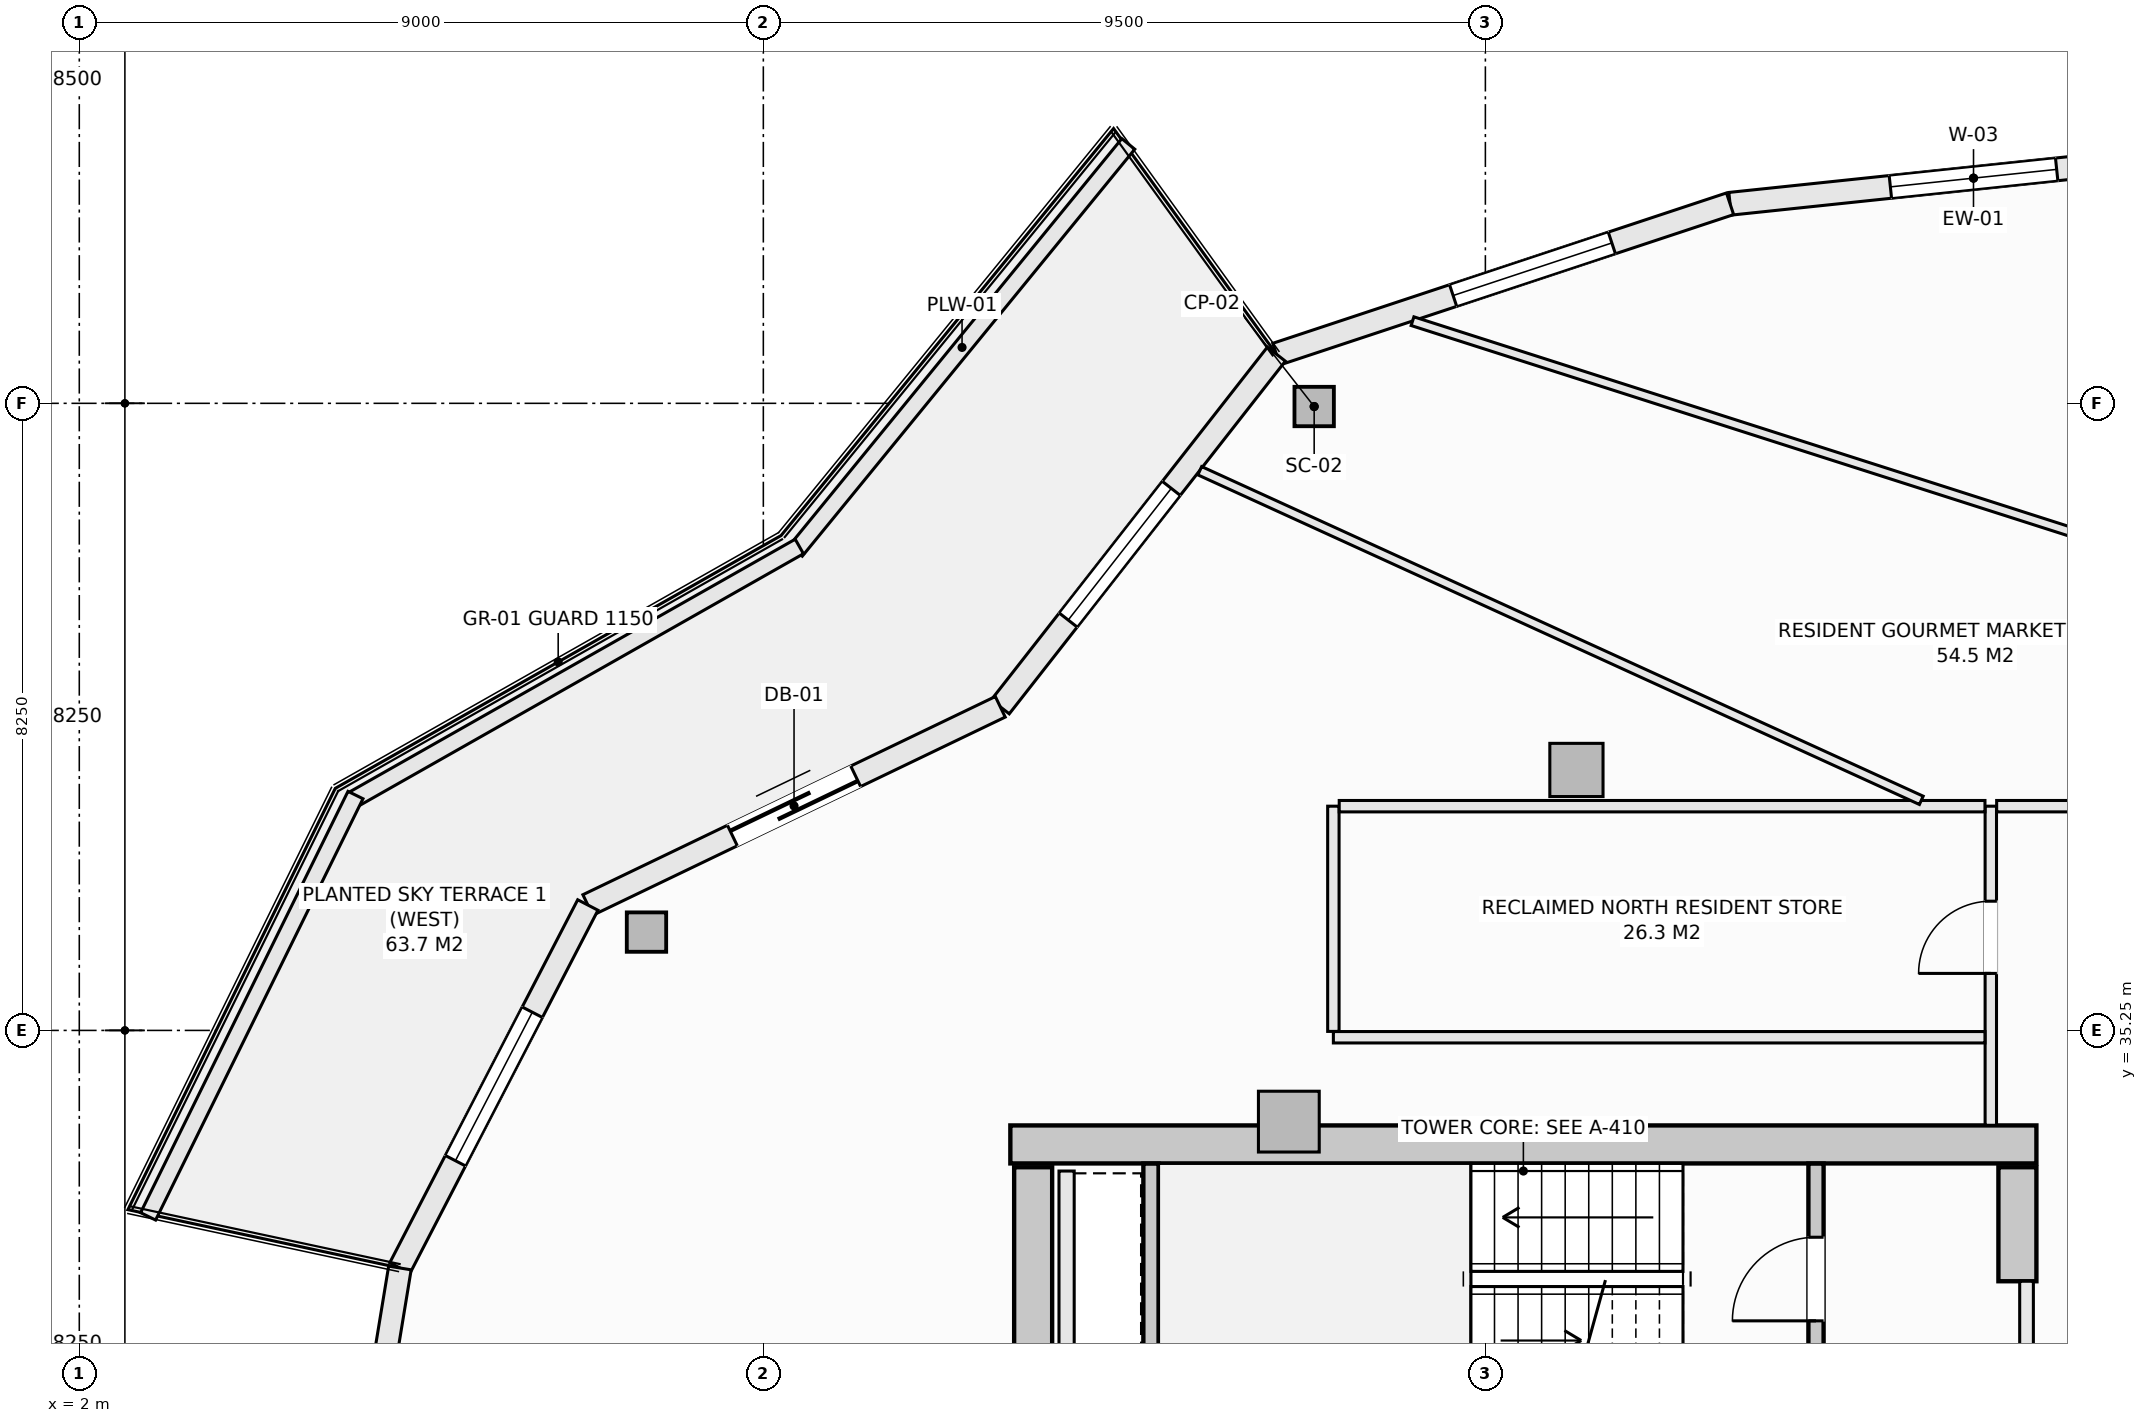
"""IFC4 building model, lengths in metres.
Left out: names, types, materials, properties, quantities, classifications, styles, units other than length and angle.
Written with IfcOpenShell. Run it as: python <this file> out.ifc"""

import sys

from ifc_helpers import new_model, si_unit, direction, frame, frame_2d, origin, origin_2d, place, context, subcontext, project, spatial, rectangle, hollow_rectangle, extrude, element, fill, save


model = new_model("IFC4")
c1 = context("Model", 3, precision=1e-05, world=origin(), true_north=direction((0.0, 1.0)))
c2 = subcontext(c1, "Body", "Model", "MODEL_VIEW")
j1 = project(units=[si_unit("LENGTHUNIT", "METRE"), si_unit("PLANEANGLEUNIT", "RADIAN")], contexts=[c1])
p1 = place(None, origin())
s1 = spatial("IfcSite", under=j1, at=p1, CompositionType="ELEMENT")
p2 = place(p1, origin())
s2 = spatial("IfcBuilding", under=s1, at=p2, CompositionType="ELEMENT")
p3 = place(p2, frame((0.0, 0.0, 236.0)))
s3 = spatial("IfcBuildingStorey", under=s2, at=p3, CompositionType="ELEMENT", Elevation=236.0)
p4 = place(p3, frame((14.25, 33.75, -0.27), z_axis=(0.0, 0.0, 1.0), x_axis=(1.0, 0.0, 0.0)))
e1 = element("IfcWall", 1, at=p4, inside=s3, PredefinedType="SHEAR", context=c2, shape_type="SweptSolid", body=[
    extrude(rectangle(XDim=13.5, YDim=0.5, at=frame_2d((6.75, 0.0))), origin(), (0.0, 0.0, 1.0), 3.3),
])
p5 = place(p3, frame((14.55, 20.55, -0.27), z_axis=(0.0, 0.0, 1.0), x_axis=(0.0, 1.0, 0.0)))
e2 = element("IfcWall", 2, at=p5, inside=s3, PredefinedType="SHEAR", context=c2, shape_type="SweptSolid", body=[
    extrude(rectangle(XDim=12.9, YDim=0.5, at=frame_2d((6.45, 0.0))), origin(), (0.0, 0.0, 1.0), 3.3),
])
p6 = place(p3, frame((27.5, 31.95, -0.27), z_axis=(0.0, 0.0, 1.0), x_axis=(0.0, 1.0, 0.0)))
e3 = element("IfcWall", 3, at=p6, inside=s3, PredefinedType="SHEAR", context=c2, shape_type="SweptSolid", body=[
    extrude(rectangle(XDim=1.5, YDim=0.5, at=frame_2d((0.75, 0.0))), origin(), (0.0, 0.0, 1.0), 3.3),
])
for number, where, z_axis, x_axis in (
    (4, (18.247, 43.458, -0.27), (0.0, 0.0, 1.0), (1.0, 0.0, 0.0)),
    (5, (9.463, 36.544, -0.27), (0.0, 0.0, 1.0), (1.0, 0.0, 0.0)),
):
    element("IfcColumn", number, at=place(p3, frame(where, z_axis=z_axis, x_axis=x_axis)), inside=s3, PredefinedType="COLUMN", context=c2, shape_type="SweptSolid", body=[
        extrude(hollow_rectangle(XDim=0.508, YDim=0.508, WallThickness=0.019, at=origin_2d()), origin(), (0.0, 0.0, 1.0), 3.3),
    ])
p7 = place(p3, frame((21.698, 38.677, -0.27), z_axis=(0.0, 0.0, 1.0), x_axis=(1.0, 0.0, 0.0)))
e6 = element("IfcColumn", 6, at=p7, inside=s3, PredefinedType="COLUMN", context=c2, shape_type="SweptSolid", body=[
    extrude(rectangle(XDim=0.7, YDim=0.7, at=origin_2d()), origin(), (0.0, 0.0, 1.0), 3.3),
])
p8 = place(p3, frame((17.914, 34.05, -0.27), z_axis=(0.0, 0.0, 1.0), x_axis=(1.0, 0.0, 0.0)))
e7 = element("IfcColumn", 7, at=p8, inside=s3, PredefinedType="PILASTER", context=c2, shape_type="SweptSolid", body=[
    extrude(rectangle(XDim=0.8, YDim=0.8, at=origin_2d()), origin(), (0.0, 0.0, 1.0), 3.3),
])
p9 = place(p3, frame((23.719, 46.125, 0.0), z_axis=(0.0, 0.0, 1.0), x_axis=(0.994497142298, 0.104763705363, 0.0)))
e8 = element("IfcWall", 8, at=p9, inside=s3, PredefinedType="SOLIDWALL", context=c2, shape_type="SweptSolid", body=[
    extrude(rectangle(XDim=6.441, YDim=0.3, at=frame_2d((3.221, 0.0))), origin(), (0.0, 0.0, 1.0), 2.605),
])
p10 = place(p9, frame((2.121, 0.0, 0.72)))
e9 = element("IfcOpeningElement", 9, at=p10, cuts=e8, PredefinedType="OPENING", context=c2, shape_type="SweptSolid", body=[
    extrude(rectangle(XDim=2.2, YDim=1.65, at=frame_2d((1.1, 0.825))), frame((0.0, 0.16, 0.0), z_axis=(0.0, -1.0, 0.0), x_axis=(1.0, 0.0, 0.0)), (0.0, 0.0, 1.0), 0.32),
])
p11 = place(p3, frame((17.75, 44.147, 0.0), z_axis=(0.0, 0.0, 1.0), x_axis=(0.949240877604, 0.314550085495, 0.0)))
e10 = element("IfcWall", 10, at=p11, inside=s3, PredefinedType="SOLIDWALL", context=c2, shape_type="SweptSolid", body=[
    extrude(rectangle(XDim=6.288, YDim=0.3, at=frame_2d((3.144, 0.0))), origin(), (0.0, 0.0, 1.0), 2.605),
])
p12 = place(p11, frame((2.45, 0.0, 0.72)))
e11 = element("IfcOpeningElement", 11, at=p12, cuts=e10, PredefinedType="OPENING", context=c2, shape_type="SweptSolid", body=[
    extrude(rectangle(XDim=2.2, YDim=1.65, at=frame_2d((1.1, 0.825))), frame((0.0, 0.16, 0.0), z_axis=(0.0, -1.0, 0.0), x_axis=(1.0, 0.0, 0.0)), (0.0, 0.0, 1.0), 0.32),
])
p13 = place(p3, frame((14.117, 39.507, 0.0), z_axis=(0.0, 0.0, 1.0), x_axis=(0.616450126935, 0.787393955401, 0.0)))
e12 = element("IfcWall", 12, at=p13, inside=s3, PredefinedType="SOLIDWALL", context=c2, shape_type="SweptSolid", body=[
    extrude(rectangle(XDim=5.893, YDim=0.3, at=frame_2d((2.946, 0.0))), origin(), (0.0, 0.0, 1.0), 2.605),
])
p14 = place(p13, frame((1.45, 0.0, 0.72)))
e13 = element("IfcOpeningElement", 13, at=p14, cuts=e12, PredefinedType="OPENING", context=c2, shape_type="SweptSolid", body=[
    extrude(rectangle(XDim=2.2, YDim=1.65, at=frame_2d((1.1, 0.825))), frame((0.0, 0.16, 0.0), z_axis=(0.0, -1.0, 0.0), x_axis=(1.0, 0.0, 0.0)), (0.0, 0.0, 1.0), 0.32),
])
p15 = place(p3, frame((8.691, 36.9, 0.0), z_axis=(0.0, 0.0, 1.0), x_axis=(0.901348331142, 0.433094892545, 0.0)))
e14 = element("IfcWall", 14, at=p15, inside=s3, PredefinedType="SOLIDWALL", context=c2, shape_type="SweptSolid", body=[
    extrude(rectangle(XDim=6.021, YDim=0.3, at=frame_2d((3.01, 0.0))), origin(), (0.0, 0.0, 1.0), 2.605),
])
p16 = place(p15, frame((2.11, 0.0, 0.0)))
e15 = element("IfcOpeningElement", 15, at=p16, cuts=e14, PredefinedType="OPENING", context=c2, shape_type="SweptSolid", body=[
    extrude(rectangle(XDim=1.8, YDim=2.25, at=frame_2d((0.9, 1.125))), frame((0.0, 0.16, 0.0), z_axis=(0.0, -1.0, 0.0), x_axis=(1.0, 0.0, 0.0)), (0.0, 0.0, 1.0), 0.32),
])
p17 = place(p3, frame((6.218, 32.125, 0.0), z_axis=(0.0, 0.0, 1.0), x_axis=(0.459808219482, 0.888018243786, 0.0)))
e16 = element("IfcWall", 16, at=p17, inside=s3, PredefinedType="SOLIDWALL", context=c2, shape_type="SweptSolid", body=[
    extrude(rectangle(XDim=5.378, YDim=0.3, at=frame_2d((2.689, 0.0))), origin(), (0.0, 0.0, 1.0), 2.605),
])
p18 = place(p17, frame((1.589, 0.0, 0.72)))
e17 = element("IfcOpeningElement", 17, at=p18, cuts=e16, PredefinedType="OPENING", context=c2, shape_type="SweptSolid", body=[
    extrude(rectangle(XDim=2.2, YDim=1.65, at=frame_2d((1.1, 0.825))), frame((0.0, 0.16, 0.0), z_axis=(0.0, -1.0, 0.0), x_axis=(1.0, 0.0, 0.0)), (0.0, 0.0, 1.0), 0.32),
])
p19 = place(p3, frame((5.375, 27.0, 0.0), z_axis=(0.0, 0.0, 1.0), x_axis=(0.16237087798, 0.986729799886, 0.0)))
e18 = element("IfcWall", 18, at=p19, inside=s3, PredefinedType="SOLIDWALL", context=c2, shape_type="SweptSolid", body=[
    extrude(rectangle(XDim=5.193, YDim=0.3, at=frame_2d((2.597, 0.0))), origin(), (0.0, 0.0, 1.0), 2.605),
])
p20 = place(p19, frame((1.497, 0.0, 0.72)))
e19 = element("IfcOpeningElement", 19, at=p20, cuts=e18, PredefinedType="OPENING", context=c2, shape_type="SweptSolid", body=[
    extrude(rectangle(XDim=2.2, YDim=1.65, at=frame_2d((1.1, 0.825))), frame((0.0, 0.16, 0.0), z_axis=(0.0, -1.0, 0.0), x_axis=(1.0, 0.0, 0.0)), (0.0, 0.0, 1.0), 0.32),
])
p21 = place(p3, frame((11.427, 41.559, 0.0), z_axis=(0.0, 0.0, 1.0), x_axis=(0.632697312147, 0.774399193699, 0.0)))
e20 = element("IfcWall", 20, at=p21, inside=s3, PredefinedType="PARAPET", context=c2, shape_type="SweptSolid", body=[
    extrude(rectangle(XDim=6.914, YDim=0.22, at=frame_2d((3.457, 0.0))), origin(), (0.0, 0.0, 1.0), 0.52),
])
p22 = place(p3, frame((5.608, 38.291, 0.0), z_axis=(0.0, 0.0, 1.0), x_axis=(0.869860619267, 0.493297580623, 0.0)))
e21 = element("IfcWall", 21, at=p22, inside=s3, PredefinedType="PARAPET", context=c2, shape_type="SweptSolid", body=[
    extrude(rectangle(XDim=6.743, YDim=0.22, at=frame_2d((3.371, 0.0))), origin(), (0.0, 0.0, 1.0), 0.52),
])
p23 = place(p3, frame((2.906, 32.804, 0.0), z_axis=(0.0, 0.0, 1.0), x_axis=(0.441640961804, 0.897191875162, 0.0)))
e22 = element("IfcWall", 22, at=p23, inside=s3, PredefinedType="PARAPET", context=c2, shape_type="SweptSolid", body=[
    extrude(rectangle(XDim=6.178, YDim=0.22, at=frame_2d((3.089, 0.0))), origin(), (0.0, 0.0, 1.0), 0.52),
])
p24 = place(p3, frame((24.85, 30.46, -0.27), z_axis=(0.0, 0.0, 1.0), x_axis=(0.0, 1.0, 0.0)))
e23 = element("IfcWall", 23, at=p24, inside=s3, PredefinedType="SHEAR", context=c2, shape_type="SweptSolid", body=[
    extrude(rectangle(XDim=3.038, YDim=0.2, at=frame_2d((1.519, 0.0))), origin(), (0.0, 0.0, 1.0), 3.3),
])
p25 = place(p24, frame((0.969, 0.0, 0.27)))
e24 = element("IfcOpeningElement", 24, at=p25, cuts=e23, PredefinedType="OPENING", context=c2, shape_type="SweptSolid", body=[
    extrude(rectangle(XDim=1.1, YDim=2.15, at=frame_2d((0.55, 1.075))), frame((0.0, 0.11, 0.0), z_axis=(0.0, -1.0, 0.0), x_axis=(1.0, 0.0, 0.0)), (0.0, 0.0, 1.0), 0.22),
])
p26 = place(p3, frame((16.1, 30.462, -0.27), z_axis=(0.0, 0.0, 1.0), x_axis=(0.0, 1.0, 0.0)))
e25 = element("IfcWall", 25, at=p26, inside=s3, PredefinedType="SHEAR", context=c2, shape_type="SweptSolid", body=[
    extrude(rectangle(XDim=3.036, YDim=0.2, at=frame_2d((1.518, 0.0))), origin(), (0.0, 0.0, 1.0), 3.3),
])
p27 = place(p3, frame((14.99, 30.55, 0.0), z_axis=(0.0, 0.0, 1.0), x_axis=(0.0, 1.0, 0.0)))
e26 = element("IfcWall", 26, at=p27, inside=s3, PredefinedType="SOLIDWALL", context=c2, shape_type="SweptSolid", body=[
    extrude(rectangle(XDim=2.85, YDim=0.2, at=frame_2d((1.425, 0.0))), origin(), (0.0, 0.0, 1.0), 3.03),
])
p28 = place(p3, frame((27.62, 22.05, 0.0), z_axis=(0.0, 0.0, 1.0), x_axis=(0.0, 1.0, 0.0)))
e27 = element("IfcWall", 27, at=p28, inside=s3, PredefinedType="SOLIDWALL", context=c2, shape_type="SweptSolid", body=[
    extrude(rectangle(XDim=9.9, YDim=0.18, at=frame_2d((4.95, 0.0))), origin(), (0.0, 0.0, 1.0), 3.03),
])
p29 = place(p28, frame((4.475, 0.0, 0.0)))
e28 = element("IfcOpeningElement", 28, at=p29, cuts=e27, PredefinedType="OPENING", context=c2, shape_type="SweptSolid", body=[
    extrude(rectangle(XDim=0.95, YDim=2.1, at=frame_2d((0.475, 1.05))), frame((0.0, 0.1, 0.0), z_axis=(0.0, -1.0, 0.0), x_axis=(1.0, 0.0, 0.0)), (0.0, 0.0, 1.0), 0.2),
])
p30 = place(p28, frame((6.89, 0.0, 0.0)))
e29 = element("IfcOpeningElement", 29, at=p30, cuts=e27, PredefinedType="OPENING", context=c2, shape_type="SweptSolid", body=[
    extrude(rectangle(XDim=1.5, YDim=2.2, at=frame_2d((0.75, 1.1))), frame((0.0, 0.1, 0.0), z_axis=(0.0, -1.0, 0.0), x_axis=(1.0, 0.0, 0.0)), (0.0, 0.0, 1.0), 0.2),
])
p31 = place(p28, frame((1.51, 0.0, 0.0)))
e30 = element("IfcOpeningElement", 30, at=p31, cuts=e27, PredefinedType="OPENING", context=c2, shape_type="SweptSolid", body=[
    extrude(rectangle(XDim=1.5, YDim=2.2, at=frame_2d((0.75, 1.1))), frame((0.0, 0.1, 0.0), z_axis=(0.0, -1.0, 0.0), x_axis=(1.0, 0.0, 0.0)), (0.0, 0.0, 1.0), 0.2),
])
p32 = place(p3, frame((27.15, 34.002, 0.0), z_axis=(0.0, 0.0, 1.0), x_axis=(0.0, 1.0, 0.0)))
e31 = element("IfcWall", 31, at=p32, inside=s3, PredefinedType="PARTITIONING", context=c2, shape_type="SweptSolid", body=[
    extrude(rectangle(XDim=4.198, YDim=0.15, at=frame_2d((2.099, 0.0))), origin(), (0.0, 0.0, 1.0), 3.03),
])
p33 = place(p32, frame((1.998, 0.0, 0.0)))
e32 = element("IfcOpeningElement", 32, at=p33, cuts=e31, PredefinedType="OPENING", context=c2, shape_type="SweptSolid", body=[
    extrude(rectangle(XDim=0.95, YDim=2.1, at=frame_2d((0.475, 1.05))), frame((0.0, 0.085, 0.0), z_axis=(0.0, -1.0, 0.0), x_axis=(1.0, 0.0, 0.0)), (0.0, 0.0, 1.0), 0.17),
])
p34 = place(p3, frame((18.5, 35.16, 0.0), z_axis=(0.0, 0.0, 1.0), x_axis=(1.0, 0.0, 0.0)))
e33 = element("IfcWall", 33, at=p34, inside=s3, PredefinedType="PARTITIONING", context=c2, shape_type="SweptSolid", body=[
    extrude(rectangle(XDim=8.573, YDim=0.15, at=frame_2d((4.287, 0.0))), origin(), (0.0, 0.0, 1.0), 3.03),
])
p35 = place(p3, frame((18.5, 35.237, 0.0), z_axis=(0.0, 0.0, 1.0), x_axis=(0.0, 1.0, 0.0)))
e34 = element("IfcWall", 34, at=p35, inside=s3, PredefinedType="PARTITIONING", context=c2, shape_type="SweptSolid", body=[
    extrude(rectangle(XDim=2.963, YDim=0.15, at=frame_2d((1.481, 0.0))), origin(), (0.0, 0.0, 1.0), 3.03),
])
p36 = place(p3, frame((18.577, 38.2, 0.0), z_axis=(0.0, 0.0, 1.0), x_axis=(1.0, 0.0, 0.0)))
e35 = element("IfcWall", 35, at=p36, inside=s3, PredefinedType="PARTITIONING", context=c2, shape_type="SweptSolid", body=[
    extrude(rectangle(XDim=8.496, YDim=0.15, at=frame_2d((4.248, 0.0))), origin(), (0.0, 0.0, 1.0), 3.03),
])
p37 = place(p3, frame((27.227, 38.2, 0.0), z_axis=(0.0, 0.0, 1.0), x_axis=(1.0, 0.0, 0.0)))
e36 = element("IfcWall", 36, at=p37, inside=s3, PredefinedType="PARTITIONING", context=c2, shape_type="SweptSolid", body=[
    extrude(rectangle(XDim=2.711, YDim=0.15, at=frame_2d((1.355, 0.0))), origin(), (0.0, 0.0, 1.0), 3.03),
])
p38 = place(p3, frame((16.742, 42.613, 0.0), z_axis=(0.0, 0.0, 1.0), x_axis=(0.909603068398, -0.415478348365, 0.0)))
e37 = element("IfcWall", 37, at=p38, inside=s3, PredefinedType="PARTITIONING", context=c2, shape_type="SweptSolid", body=[
    extrude(rectangle(XDim=10.437, YDim=0.12, at=frame_2d((5.218, 0.0))), origin(), (0.0, 0.0, 1.0), 1.823),
])
p39 = place(p3, frame((19.542, 44.581, 0.0), z_axis=(0.0, 0.0, 1.0), x_axis=(0.952423071243, -0.304779089445, 0.0)))
e38 = element("IfcWall", 38, at=p39, inside=s3, PredefinedType="PARTITIONING", context=c2, shape_type="SweptSolid", body=[
    extrude(rectangle(XDim=13.173, YDim=0.12, at=frame_2d((6.586, 0.0))), origin(), (0.0, 0.0, 1.0), 2.605),
])
p40 = place(p10, origin())
e39 = element("IfcWindow", 39, at=p40, inside=s3, PartitioningType="SINGLE_PANEL", PredefinedType="WINDOW", context=c2, shape_type="SweptSolid", body=[
    extrude(rectangle(XDim=2.2, YDim=1.65, at=frame_2d((1.1, 0.825))), frame((0.0, 0.03, 0.0), z_axis=(0.0, -1.0, 0.0), x_axis=(1.0, 0.0, 0.0)), (0.0, 0.0, 1.0), 0.06),
])
fill(e9, e39)
p41 = place(p12, origin())
e40 = element("IfcWindow", 40, at=p41, inside=s3, PartitioningType="SINGLE_PANEL", PredefinedType="WINDOW", context=c2, shape_type="SweptSolid", body=[
    extrude(rectangle(XDim=2.2, YDim=1.65, at=frame_2d((1.1, 0.825))), frame((0.0, 0.03, 0.0), z_axis=(0.0, -1.0, 0.0), x_axis=(1.0, 0.0, 0.0)), (0.0, 0.0, 1.0), 0.06),
])
fill(e11, e40)
p42 = place(p14, origin())
e41 = element("IfcWindow", 41, at=p42, inside=s3, PartitioningType="SINGLE_PANEL", PredefinedType="WINDOW", context=c2, shape_type="SweptSolid", body=[
    extrude(rectangle(XDim=2.2, YDim=1.65, at=frame_2d((1.1, 0.825))), frame((0.0, 0.03, 0.0), z_axis=(0.0, -1.0, 0.0), x_axis=(1.0, 0.0, 0.0)), (0.0, 0.0, 1.0), 0.06),
])
fill(e13, e41)
p43 = place(p16, origin())
e42 = element("IfcDoor", 42, at=p43, inside=s3, OperationType="SLIDING_TO_LEFT", PredefinedType="DOOR", context=c2, shape_type="SweptSolid", body=[
    extrude(rectangle(XDim=1.8, YDim=2.25, at=frame_2d((0.9, 1.125))), frame((0.0, 0.025, 0.0), z_axis=(0.0, -1.0, 0.0), x_axis=(1.0, 0.0, 0.0)), (0.0, 0.0, 1.0), 0.05),
])
fill(e15, e42)
p44 = place(p18, origin())
e43 = element("IfcWindow", 43, at=p44, inside=s3, PartitioningType="SINGLE_PANEL", PredefinedType="WINDOW", context=c2, shape_type="SweptSolid", body=[
    extrude(rectangle(XDim=2.2, YDim=1.65, at=frame_2d((1.1, 0.825))), frame((0.0, 0.03, 0.0), z_axis=(0.0, -1.0, 0.0), x_axis=(1.0, 0.0, 0.0)), (0.0, 0.0, 1.0), 0.06),
])
fill(e17, e43)
p45 = place(p25, origin())
e44 = element("IfcDoor", 44, at=p45, inside=s3, OperationType="SINGLE_SWING_LEFT", PredefinedType="DOOR", context=c2, shape_type="SweptSolid", body=[
    extrude(rectangle(XDim=1.1, YDim=2.15, at=frame_2d((0.55, 1.075))), frame((0.0, 0.025, 0.0), z_axis=(0.0, -1.0, 0.0), x_axis=(1.0, 0.0, 0.0)), (0.0, 0.0, 1.0), 0.05),
])
fill(e24, e44)
p46 = place(p33, origin())
e45 = element("IfcDoor", 45, at=p46, inside=s3, OperationType="SINGLE_SWING_LEFT", PredefinedType="DOOR", context=c2, shape_type="SweptSolid", body=[
    extrude(rectangle(XDim=0.95, YDim=2.1, at=frame_2d((0.475, 1.05))), frame((0.0, 0.025, 0.0), z_axis=(0.0, -1.0, 0.0), x_axis=(1.0, 0.0, 0.0)), (0.0, 0.0, 1.0), 0.05),
])
fill(e32, e45)
save(model, sys.argv[1])
